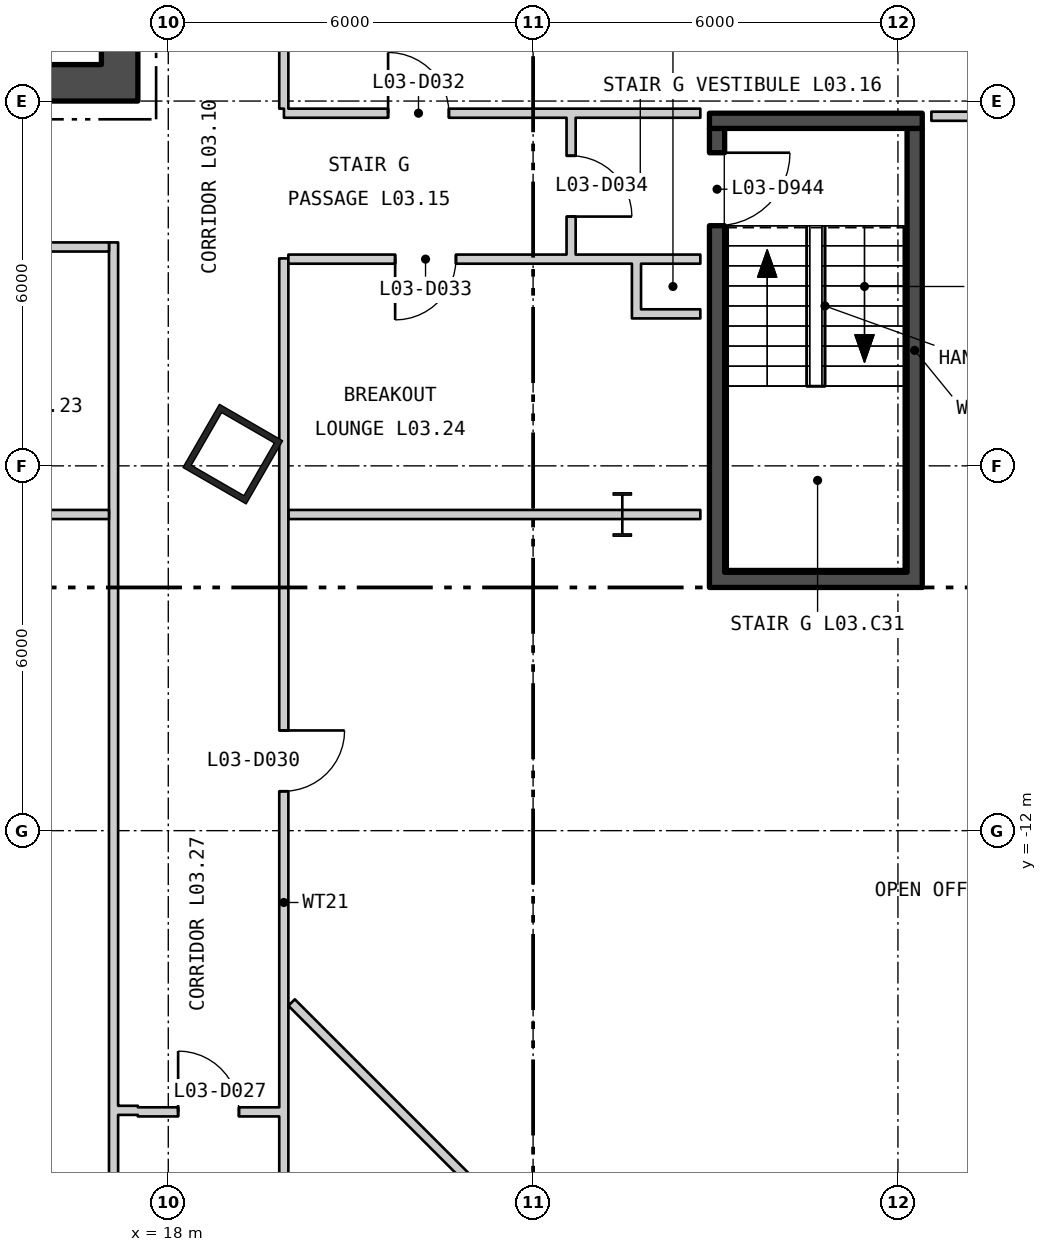
"""IFC4 building model, lengths in metres.
Left out: names, types, materials, properties, quantities, classifications, styles, units other than length and angle.
Written with IfcOpenShell. Run it as: python <this file> out.ifc"""

import sys

from ifc_helpers import new_model, si_unit, direction, frame, frame_2d, origin, origin_2d, place, context, subcontext, project, spatial, rectangle, hollow_rectangle, i_section, extrude, element, fill, save


model = new_model("IFC4")
c1 = context("Model", 3, precision=1e-05, world=origin(), true_north=direction((0.0, 1.0)))
c2 = subcontext(c1, "Body", "Model", "MODEL_VIEW")
j1 = project(units=[si_unit("LENGTHUNIT", "METRE"), si_unit("PLANEANGLEUNIT", "RADIAN")], contexts=[c1])
p1 = place(None, origin())
s1 = spatial("IfcSite", under=j1, at=p1, CompositionType="ELEMENT")
p2 = place(p1, origin())
s2 = spatial("IfcBuilding", under=s1, at=p2, CompositionType="ELEMENT")
p3 = place(p2, frame((0.0, 0.0, 18.6)))
s3 = spatial("IfcBuildingStorey", under=s2, at=p3, CompositionType="ELEMENT", Elevation=18.6)
p4 = place(p3, frame((19.061, -5.807, 0.0), z_axis=(0.0, 0.0, 1.0), x_axis=(0.5, 0.866025403784, 0.0)))
e1 = element("IfcColumn", 1, at=p4, inside=s3, PredefinedType="COLUMN", context=c2, shape_type="SweptSolid", body=[
    extrude(hollow_rectangle(XDim=1.2, YDim=1.2, WallThickness=0.1, at=origin_2d()), origin(), (0.0, 0.0, 1.0), 5.1),
])
p5 = place(p3, frame((25.467, -6.8, 0.0), z_axis=(0.0, 0.0, 1.0), x_axis=(1.0, 0.0, 0.0)))
e2 = element("IfcColumn", 2, at=p5, inside=s3, PredefinedType="COLUMN", context=c2, shape_type="SweptSolid", body=[
    extrude(i_section(OverallWidth=0.304, OverallDepth=0.716, WebThickness=0.021, FlangeThickness=0.04, at=origin_2d()), origin(), (0.0, 0.0, 1.0), 5.1),
])
p6 = place(p3, frame((-17.5, 0.3, 0.0), z_axis=(0.0, 0.0, 1.0), x_axis=(1.0, 0.0, 0.0)))
e3 = element("IfcWall", 3, at=p6, inside=s3, PredefinedType="SHEAR", context=c2, shape_type="SweptSolid", body=[
    extrude(rectangle(XDim=35.0, YDim=0.6, at=frame_2d((17.5, 0.0))), origin(), (0.0, 0.0, 1.0), 4.88),
])
p7 = place(p6, frame((12.0, 0.0, 0.0)))
e4 = element("IfcOpeningElement", 4, at=p7, cuts=e3, PredefinedType="OPENING", context=c2, shape_type="SweptSolid", body=[
    extrude(rectangle(XDim=1.8, YDim=2.4, at=frame_2d((0.9, 1.2))), frame((0.0, 0.31, 0.0), z_axis=(0.0, -1.0, 0.0), x_axis=(1.0, 0.0, 0.0)), (0.0, 0.0, 1.0), 0.62),
])
p8 = place(p6, frame((22.0, 0.0, 0.0)))
e5 = element("IfcOpeningElement", 5, at=p8, cuts=e3, PredefinedType="OPENING", context=c2, shape_type="SweptSolid", body=[
    extrude(rectangle(XDim=1.8, YDim=2.4, at=frame_2d((0.9, 1.2))), frame((0.0, 0.31, 0.0), z_axis=(0.0, -1.0, 0.0), x_axis=(1.0, 0.0, 0.0)), (0.0, 0.0, 1.0), 0.62),
])
p9 = place(p3, frame((17.2, 0.6, 0.0), z_axis=(0.0, 0.0, 1.0), x_axis=(0.0, 1.0, 0.0)))
e6 = element("IfcWall", 6, at=p9, inside=s3, PredefinedType="SHEAR", context=c2, shape_type="SweptSolid", body=[
    extrude(rectangle(XDim=16.8, YDim=0.6, at=frame_2d((8.4, 0.0))), origin(), (0.0, 0.0, 1.0), 4.88),
])
p10 = place(p9, frame((5.7, 0.0, 0.0)))
e7 = element("IfcOpeningElement", 7, at=p10, cuts=e6, PredefinedType="OPENING", context=c2, shape_type="SweptSolid", body=[
    extrude(rectangle(XDim=1.5, YDim=2.1, at=frame_2d((0.75, 1.05))), frame((0.0, 0.31, 0.0), z_axis=(0.0, -1.0, 0.0), x_axis=(1.0, 0.0, 0.0)), (0.0, 0.0, 1.0), 0.62),
])
p11 = place(p9, frame((0.4, 0.0, 0.0)))
e8 = element("IfcOpeningElement", 8, at=p11, cuts=e6, PredefinedType="OPENING", context=c2, shape_type="SweptSolid", body=[
    extrude(rectangle(XDim=0.9, YDim=2.1, at=frame_2d((0.45, 1.05))), frame((0.0, 0.31, 0.0), z_axis=(0.0, -1.0, 0.0), x_axis=(1.0, 0.0, 0.0)), (0.0, 0.0, 1.0), 0.62),
])
p12 = place(p9, frame((3.15, 0.0, 0.0)))
e9 = element("IfcOpeningElement", 9, at=p12, cuts=e6, PredefinedType="OPENING", context=c2, shape_type="SweptSolid", body=[
    extrude(rectangle(XDim=0.9, YDim=2.1, at=frame_2d((0.45, 1.05))), frame((0.0, 0.31, 0.0), z_axis=(0.0, -1.0, 0.0), x_axis=(1.0, 0.0, 0.0)), (0.0, 0.0, 1.0), 0.62),
])
p13 = place(p9, frame((8.082, 0.0, 0.0)))
e10 = element("IfcOpeningElement", 10, at=p13, cuts=e6, PredefinedType="OPENING", context=c2, shape_type="SweptSolid", body=[
    extrude(rectangle(XDim=1.0, YDim=2.1, at=frame_2d((0.5, 1.05))), frame((0.0, 0.31, 0.0), z_axis=(0.0, -1.0, 0.0), x_axis=(1.0, 0.0, 0.0)), (0.0, 0.0, 1.0), 0.62),
])
p14 = place(p9, frame((11.801, 0.0, 0.0)))
e11 = element("IfcOpeningElement", 11, at=p14, cuts=e6, PredefinedType="OPENING", context=c2, shape_type="SweptSolid", body=[
    extrude(rectangle(XDim=0.9, YDim=2.1, at=frame_2d((0.45, 1.05))), frame((0.0, 0.31, 0.0), z_axis=(0.0, -1.0, 0.0), x_axis=(1.0, 0.0, 0.0)), (0.0, 0.0, 1.0), 0.62),
])
p15 = place(p9, frame((15.294, 0.0, 0.0)))
e12 = element("IfcOpeningElement", 12, at=p15, cuts=e6, PredefinedType="OPENING", context=c2, shape_type="SweptSolid", body=[
    extrude(rectangle(XDim=0.9, YDim=2.1, at=frame_2d((0.45, 1.05))), frame((0.0, 0.31, 0.0), z_axis=(0.0, -1.0, 0.0), x_axis=(1.0, 0.0, 0.0)), (0.0, 0.0, 1.0), 0.62),
])
p16 = place(p3, frame((27.025, -7.75, 0.0), z_axis=(0.0, 0.0, 1.0), x_axis=(0.0, 1.0, 0.0)))
e13 = element("IfcWall", 13, at=p16, inside=s3, PredefinedType="SHEAR", context=c2, shape_type="SweptSolid", body=[
    extrude(rectangle(XDim=7.3, YDim=0.25, at=frame_2d((3.65, 0.0))), origin(), (0.0, 0.0, 1.0), 4.88),
])
p17 = place(p16, frame((5.7, 0.0, 0.0)))
e14 = element("IfcOpeningElement", 14, at=p17, cuts=e13, PredefinedType="OPENING", context=c2, shape_type="SweptSolid", body=[
    extrude(rectangle(XDim=1.2, YDim=2.1, at=frame_2d((0.6, 1.05))), frame((0.0, 0.135, 0.0), z_axis=(0.0, -1.0, 0.0), x_axis=(1.0, 0.0, 0.0)), (0.0, 0.0, 1.0), 0.27),
])
p18 = place(p3, frame((30.275, -7.75, 0.0), z_axis=(0.0, 0.0, 1.0), x_axis=(0.0, 1.0, 0.0)))
e15 = element("IfcWall", 15, at=p18, inside=s3, PredefinedType="SHEAR", context=c2, shape_type="SweptSolid", body=[
    extrude(rectangle(XDim=7.3, YDim=0.25, at=frame_2d((3.65, 0.0))), origin(), (0.0, 0.0, 1.0), 4.88),
])
for number, where, z_axis, x_axis in (
    (16, (26.9, -7.875, 0.0), (0.0, 0.0, 1.0), (1.0, 0.0, 0.0)),
    (17, (26.9, -0.325, 0.0), (0.0, 0.0, 1.0), (1.0, 0.0, 0.0)),
):
    element("IfcWall", number, at=place(p3, frame(where, z_axis=z_axis, x_axis=x_axis)), inside=s3, PredefinedType="SHEAR", context=c2, shape_type="SweptSolid", body=[
        extrude(rectangle(XDim=3.5, YDim=0.25, at=frame_2d((1.75, 0.0))), origin(), (0.0, 0.0, 1.0), 4.88),
    ])
p19 = place(p3, frame((9.075, -6.8, 0.0), z_axis=(0.0, 0.0, 1.0), x_axis=(1.0, 0.0, 0.0)))
e18 = element("IfcWall", 18, at=p19, inside=s3, PredefinedType="PARTITIONING", context=c2, shape_type="SweptSolid", body=[
    extrude(rectangle(XDim=7.95, YDim=0.15, at=frame_2d((3.975, 0.0))), origin(), (0.0, 0.0, 1.0), 4.88),
])
p20 = place(p3, frame((9.075, -2.4, 0.0), z_axis=(0.0, 0.0, 1.0), x_axis=(1.0, 0.0, 0.0)))
e19 = element("IfcWall", 19, at=p20, inside=s3, PredefinedType="PARTITIONING", context=c2, shape_type="SweptSolid", body=[
    extrude(rectangle(XDim=7.95, YDim=0.15, at=frame_2d((3.975, 0.0))), origin(), (0.0, 0.0, 1.0), 4.88),
])
p21 = place(p20, frame((1.304, 0.0, 0.0)))
e20 = element("IfcOpeningElement", 20, at=p21, cuts=e19, PredefinedType="OPENING", context=c2, shape_type="SweptSolid", body=[
    extrude(rectangle(XDim=1.0, YDim=2.1, at=frame_2d((0.5, 1.05))), frame((0.0, 0.085, 0.0), z_axis=(0.0, -1.0, 0.0), x_axis=(1.0, 0.0, 0.0)), (0.0, 0.0, 1.0), 0.17),
])
p22 = place(p20, frame((5.304, 0.0, 0.0)))
e21 = element("IfcOpeningElement", 21, at=p22, cuts=e19, PredefinedType="OPENING", context=c2, shape_type="SweptSolid", body=[
    extrude(rectangle(XDim=1.0, YDim=2.1, at=frame_2d((0.5, 1.05))), frame((0.0, 0.085, 0.0), z_axis=(0.0, -1.0, 0.0), x_axis=(1.0, 0.0, 0.0)), (0.0, 0.0, 1.0), 0.17),
])
p23 = place(p3, frame((17.1, -21.375, 0.0), z_axis=(0.0, 0.0, 1.0), x_axis=(0.0, 1.0, 0.0)))
e22 = element("IfcWall", 22, at=p23, inside=s3, PredefinedType="PARTITIONING", context=c2, shape_type="SweptSolid", body=[
    extrude(rectangle(XDim=19.05, YDim=0.15, at=frame_2d((9.525, 0.0))), origin(), (0.0, 0.0, 1.0), 4.88),
])
p24 = place(p3, frame((17.175, -16.6, 0.0), z_axis=(0.0, 0.0, 1.0), x_axis=(1.0, 0.0, 0.0)))
e23 = element("IfcWall", 23, at=p24, inside=s3, PredefinedType="PARTITIONING", context=c2, shape_type="SweptSolid", body=[
    extrude(rectangle(XDim=0.325, YDim=0.15, at=frame_2d((0.163, 0.0))), origin(), (0.0, 0.0, 1.0), 4.88),
])
p25 = place(p3, frame((17.5, -16.625, 0.0), z_axis=(0.0, 0.0, 1.0), x_axis=(1.0, 0.0, 0.0)))
e24 = element("IfcWall", 24, at=p25, inside=s3, PredefinedType="PARTITIONING", context=c2, shape_type="SweptSolid", body=[
    extrude(rectangle(XDim=2.325, YDim=0.15, at=frame_2d((1.163, 0.0))), origin(), (0.0, 0.0, 1.0), 4.88),
])
p26 = place(p25, frame((0.662, 0.0, 0.0)))
e25 = element("IfcOpeningElement", 25, at=p26, cuts=e24, PredefinedType="OPENING", context=c2, shape_type="SweptSolid", body=[
    extrude(rectangle(XDim=1.0, YDim=2.1, at=frame_2d((0.5, 1.05))), frame((0.0, 0.085, 0.0), z_axis=(0.0, -1.0, 0.0), x_axis=(1.0, 0.0, 0.0)), (0.0, 0.0, 1.0), 0.17),
])
p27 = place(p3, frame((19.9, -23.775, 0.0), z_axis=(0.0, 0.0, 1.0), x_axis=(0.0, 1.0, 0.0)))
e26 = element("IfcWall", 26, at=p27, inside=s3, PredefinedType="PARTITIONING", context=c2, shape_type="SweptSolid", body=[
    extrude(rectangle(XDim=21.187, YDim=0.15, at=frame_2d((10.594, 0.0))), origin(), (0.0, 0.0, 1.0), 4.88),
])
p28 = place(p27, frame((3.017, 0.0, 0.0)))
e27 = element("IfcOpeningElement", 27, at=p28, cuts=e26, PredefinedType="OPENING", context=c2, shape_type="SweptSolid", body=[
    extrude(rectangle(XDim=1.0, YDim=2.1, at=frame_2d((0.5, 1.05))), frame((0.0, 0.085, 0.0), z_axis=(0.0, -1.0, 0.0), x_axis=(1.0, 0.0, 0.0)), (0.0, 0.0, 1.0), 0.17),
])
p29 = place(p27, frame((12.423, 0.0, 0.0)))
e28 = element("IfcOpeningElement", 28, at=p29, cuts=e26, PredefinedType="OPENING", context=c2, shape_type="SweptSolid", body=[
    extrude(rectangle(XDim=1.0, YDim=2.1, at=frame_2d((0.5, 1.05))), frame((0.0, 0.085, 0.0), z_axis=(0.0, -1.0, 0.0), x_axis=(1.0, 0.0, 0.0)), (0.0, 0.0, 1.0), 0.17),
])
p30 = place(p3, frame((19.9, -0.125, 0.0), z_axis=(0.0, 0.0, 1.0), x_axis=(0.0, 1.0, 0.0)))
e29 = element("IfcWall", 29, at=p30, inside=s3, PredefinedType="PARTITIONING", context=c2, shape_type="SweptSolid", body=[
    extrude(rectangle(XDim=1.15, YDim=0.15, at=frame_2d((0.575, 0.0))), origin(), (0.0, 0.0, 1.0), 4.88),
])
p31 = place(p3, frame((19.902, -0.2, 0.0), z_axis=(0.0, 0.0, 1.0), x_axis=(1.0, 0.0, 0.0)))
e30 = element("IfcWall", 30, at=p31, inside=s3, PredefinedType="PARTITIONING", context=c2, shape_type="SweptSolid", body=[
    extrude(rectangle(XDim=6.848, YDim=0.15, at=frame_2d((3.424, 0.0))), origin(), (0.0, 0.0, 1.0), 4.88),
])
p32 = place(p31, frame((1.713, 0.0, 0.0)))
e31 = element("IfcOpeningElement", 31, at=p32, cuts=e30, PredefinedType="OPENING", context=c2, shape_type="SweptSolid", body=[
    extrude(rectangle(XDim=1.0, YDim=2.1, at=frame_2d((0.5, 1.05))), frame((0.0, 0.085, 0.0), z_axis=(0.0, -1.0, 0.0), x_axis=(1.0, 0.0, 0.0)), (0.0, 0.0, 1.0), 0.17),
])
p33 = place(p3, frame((19.975, -6.8, 0.0), z_axis=(0.0, 0.0, 1.0), x_axis=(1.0, 0.0, 0.0)))
e32 = element("IfcWall", 32, at=p33, inside=s3, PredefinedType="PARTITIONING", context=c2, shape_type="SweptSolid", body=[
    extrude(rectangle(XDim=6.775, YDim=0.15, at=frame_2d((3.388, 0.0))), origin(), (0.0, 0.0, 1.0), 4.09),
])
p34 = place(p3, frame((19.975, -2.6, 0.0), z_axis=(0.0, 0.0, 1.0), x_axis=(1.0, 0.0, 0.0)))
e33 = element("IfcWall", 33, at=p34, inside=s3, PredefinedType="PARTITIONING", context=c2, shape_type="SweptSolid", body=[
    extrude(rectangle(XDim=5.713, YDim=0.15, at=frame_2d((2.857, 0.0))), origin(), (0.0, 0.0, 1.0), 4.88),
])
p35 = place(p34, frame((1.756, 0.0, 0.0)))
e34 = element("IfcOpeningElement", 34, at=p35, cuts=e33, PredefinedType="OPENING", context=c2, shape_type="SweptSolid", body=[
    extrude(rectangle(XDim=1.0, YDim=2.1, at=frame_2d((0.5, 1.05))), frame((0.0, 0.085, 0.0), z_axis=(0.0, -1.0, 0.0), x_axis=(1.0, 0.0, 0.0)), (0.0, 0.0, 1.0), 0.17),
])
p36 = place(p3, frame((20.028, -14.827, 0.0), z_axis=(0.0, 0.0, 1.0), x_axis=(0.707106781187, -0.707106781187, 0.0)))
e35 = element("IfcWall", 35, at=p36, inside=s3, PredefinedType="PARTITIONING", context=c2, shape_type="SweptSolid", body=[
    extrude(rectangle(XDim=7.068, YDim=0.15, at=frame_2d((3.534, 0.0))), origin(), (0.0, 0.0, 1.0), 4.88),
])
p37 = place(p3, frame((24.625, -2.525, 0.0), z_axis=(0.0, 0.0, 1.0), x_axis=(0.0, 1.0, 0.0)))
e36 = element("IfcWall", 36, at=p37, inside=s3, PredefinedType="PARTITIONING", context=c2, shape_type="SweptSolid", body=[
    extrude(rectangle(XDim=2.25, YDim=0.15, at=frame_2d((1.125, 0.0))), origin(), (0.0, 0.0, 1.0), 4.88),
])
p38 = place(p37, frame((0.625, 0.0, 0.0)))
e37 = element("IfcOpeningElement", 37, at=p38, cuts=e36, PredefinedType="OPENING", context=c2, shape_type="SweptSolid", body=[
    extrude(rectangle(XDim=1.0, YDim=2.1, at=frame_2d((0.5, 1.05))), frame((0.0, 0.085, 0.0), z_axis=(0.0, -1.0, 0.0), x_axis=(1.0, 0.0, 0.0)), (0.0, 0.0, 1.0), 0.17),
])
p39 = place(p3, frame((25.625, -3.5, 0.0), z_axis=(0.0, 0.0, 1.0), x_axis=(1.0, 0.0, 0.0)))
e38 = element("IfcWall", 38, at=p39, inside=s3, PredefinedType="PARTITIONING", context=c2, shape_type="SweptSolid", body=[
    extrude(rectangle(XDim=1.125, YDim=0.15, at=frame_2d((0.562, 0.0))), origin(), (0.0, 0.0, 1.0), 4.88),
])
p40 = place(p3, frame((25.688, -2.6, 0.0), z_axis=(0.0, 0.0, 1.0), x_axis=(1.0, 0.0, 0.0)))
e39 = element("IfcWall", 39, at=p40, inside=s3, PredefinedType="PARTITIONING", context=c2, shape_type="SweptSolid", body=[
    extrude(rectangle(XDim=1.062, YDim=0.15, at=frame_2d((0.531, 0.0))), origin(), (0.0, 0.0, 1.0), 4.88),
])
p41 = place(p3, frame((25.7, -3.425, 0.0), z_axis=(0.0, 0.0, 1.0), x_axis=(0.0, 1.0, 0.0)))
e40 = element("IfcWall", 40, at=p41, inside=s3, PredefinedType="PARTITIONING", context=c2, shape_type="SweptSolid", body=[
    extrude(rectangle(XDim=0.75, YDim=0.15, at=frame_2d((0.375, 0.0))), origin(), (0.0, 0.0, 1.0), 4.88),
])
p42 = place(p3, frame((30.55, -0.25, 0.0), z_axis=(0.0, 0.0, 1.0), x_axis=(1.0, 0.0, 0.0)))
e41 = element("IfcWall", 41, at=p42, inside=s3, PredefinedType="PARTITIONING", context=c2, shape_type="SweptSolid", body=[
    extrude(rectangle(XDim=7.55, YDim=0.15, at=frame_2d((3.775, 0.0))), origin(), (0.0, 0.0, 1.0), 4.88),
])
p43 = place(p17, origin())
e42 = element("IfcDoor", 42, at=p43, inside=s3, OperationType="SINGLE_SWING_RIGHT", PredefinedType="DOOR", context=c2, shape_type="SweptSolid", body=[
    extrude(rectangle(XDim=1.2, YDim=2.1, at=frame_2d((0.6, 1.05))), frame((0.0, 0.025, 0.0), z_axis=(0.0, -1.0, 0.0), x_axis=(1.0, 0.0, 0.0)), (0.0, 0.0, 1.0), 0.05),
])
fill(e14, e42)
p44 = place(p26, origin())
e43 = element("IfcDoor", 43, at=p44, inside=s3, OperationType="SINGLE_SWING_RIGHT", PredefinedType="DOOR", context=c2, shape_type="SweptSolid", body=[
    extrude(rectangle(XDim=1.0, YDim=2.1, at=frame_2d((0.5, 1.05))), frame((0.0, 0.025, 0.0), z_axis=(0.0, -1.0, 0.0), x_axis=(1.0, 0.0, 0.0)), (0.0, 0.0, 1.0), 0.05),
])
fill(e25, e43)
p45 = place(p29, origin())
e44 = element("IfcDoor", 44, at=p45, inside=s3, OperationType="SINGLE_SWING_RIGHT", PredefinedType="DOOR", context=c2, shape_type="SweptSolid", body=[
    extrude(rectangle(XDim=1.0, YDim=2.1, at=frame_2d((0.5, 1.05))), frame((0.0, 0.025, 0.0), z_axis=(0.0, -1.0, 0.0), x_axis=(1.0, 0.0, 0.0)), (0.0, 0.0, 1.0), 0.05),
])
fill(e28, e44)
p46 = place(p32, origin())
e45 = element("IfcDoor", 45, at=p46, inside=s3, OperationType="SINGLE_SWING_RIGHT", PredefinedType="DOOR", context=c2, shape_type="SweptSolid", body=[
    extrude(rectangle(XDim=1.0, YDim=2.1, at=frame_2d((0.5, 1.05))), frame((0.0, 0.025, 0.0), z_axis=(0.0, -1.0, 0.0), x_axis=(1.0, 0.0, 0.0)), (0.0, 0.0, 1.0), 0.05),
])
fill(e31, e45)
p47 = place(p35, origin())
e46 = element("IfcDoor", 46, at=p47, inside=s3, OperationType="SINGLE_SWING_LEFT", PredefinedType="DOOR", context=c2, shape_type="SweptSolid", body=[
    extrude(rectangle(XDim=1.0, YDim=2.1, at=frame_2d((0.5, 1.05))), frame((0.0, 0.025, 0.0), z_axis=(0.0, -1.0, 0.0), x_axis=(1.0, 0.0, 0.0)), (0.0, 0.0, 1.0), 0.05),
])
fill(e34, e46)
p48 = place(p38, origin())
e47 = element("IfcDoor", 47, at=p48, inside=s3, OperationType="SINGLE_SWING_LEFT", PredefinedType="DOOR", context=c2, shape_type="SweptSolid", body=[
    extrude(rectangle(XDim=1.0, YDim=2.1, at=frame_2d((0.5, 1.05))), frame((0.0, 0.025, 0.0), z_axis=(0.0, -1.0, 0.0), x_axis=(1.0, 0.0, 0.0)), (0.0, 0.0, 1.0), 0.05),
])
fill(e37, e47)
save(model, sys.argv[1])
